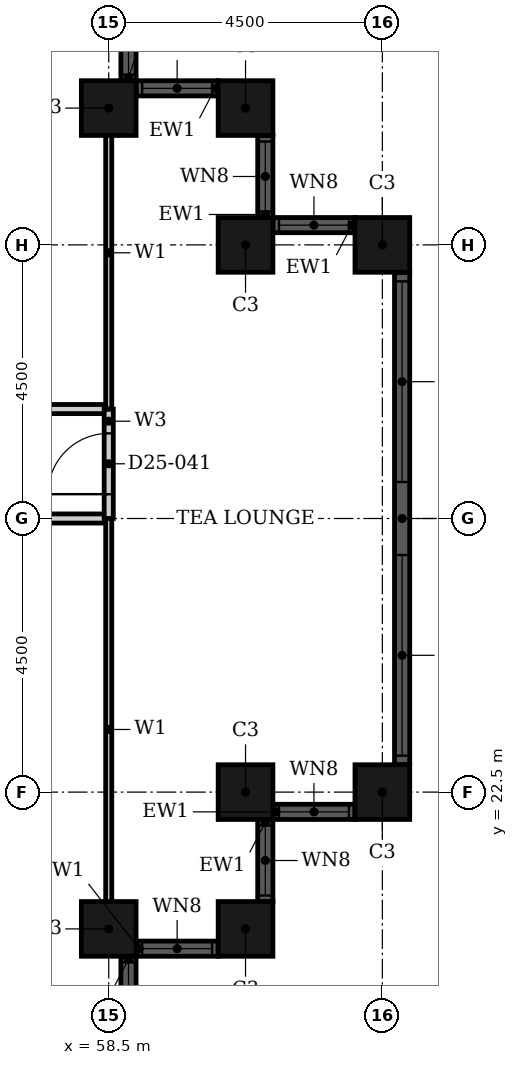
"""IFC4 building model, lengths in metres.
Left out: names, types, materials, properties, quantities, classifications, styles, units other than length and angle.
Written with IfcOpenShell. Run it as: python <this file> out.ifc"""

import sys

from ifc_helpers import new_model, si_unit, direction, frame, frame_2d, origin, origin_2d, place, context, subcontext, project, spatial, rectangle, hollow_rectangle, extrude, element, fill, save


model = new_model("IFC4")
c1 = context("Model", 3, precision=1e-05, world=origin(), true_north=direction((0.0, 1.0)))
c2 = subcontext(c1, "Body", "Model", "MODEL_VIEW")
j1 = project(units=[si_unit("LENGTHUNIT", "METRE"), si_unit("PLANEANGLEUNIT", "RADIAN")], contexts=[c1])
p1 = place(None, origin())
s1 = spatial("IfcSite", under=j1, at=p1, CompositionType="ELEMENT")
p2 = place(p1, origin())
s2 = spatial("IfcBuilding", under=s1, at=p2, CompositionType="ELEMENT")
p3 = place(p2, frame((0.0, 0.0, 104.4)))
s3 = spatial("IfcBuildingStorey", under=s2, at=p3, CompositionType="ELEMENT", Elevation=104.4)
for number, where, z_axis, x_axis in (
    (1, (58.5, 20.25, 0.0), (0.0, 0.0, 1.0), (1.0, 0.0, 0.0)),
    (2, (60.75, 20.25, 0.0), (0.0, 0.0, 1.0), (1.0, 0.0, 0.0)),
    (3, (60.75, 22.5, 0.0), (0.0, 0.0, 1.0), (1.0, 0.0, 0.0)),
    (4, (63.0, 22.5, 0.0), (0.0, 0.0, 1.0), (1.0, 0.0, 0.0)),
    (5, (63.0, 31.5, 0.0), (0.0, 0.0, 1.0), (1.0, 0.0, 0.0)),
    (6, (60.75, 31.5, 0.0), (0.0, 0.0, 1.0), (1.0, 0.0, 0.0)),
    (7, (60.75, 33.75, 0.0), (0.0, 0.0, 1.0), (1.0, 0.0, 0.0)),
    (8, (58.5, 33.75, 0.0), (0.0, 0.0, 1.0), (1.0, 0.0, 0.0)),
):
    element("IfcColumn", number, at=place(p3, frame(where, z_axis=z_axis, x_axis=x_axis)), inside=s3, PredefinedType="COLUMN", context=c2, shape_type="SweptSolid", body=[
        extrude(hollow_rectangle(XDim=0.9, YDim=0.9, WallThickness=0.028, at=origin_2d()), origin(), (0.0, 0.0, 1.0), 3.6),
    ])
p4 = place(p3, frame((58.825, 18.45, 0.0), z_axis=(0.0, 0.0, 1.0), x_axis=(0.0, 1.0, 0.0)))
e9 = element("IfcWall", 9, at=p4, inside=s3, PredefinedType="SOLIDWALL", context=c2, shape_type="SweptSolid", body=[
    extrude(rectangle(XDim=1.35, YDim=0.25, at=frame_2d((0.675, 0.0))), origin(), (0.0, 0.0, 1.0), 3.6),
])
p5 = place(p4, frame((0.1, 0.0, 0.9)))
e10 = element("IfcOpeningElement", 10, at=p5, cuts=e9, PredefinedType="OPENING", context=c2, shape_type="SweptSolid", body=[
    extrude(rectangle(XDim=1.15, YDim=2.08, at=frame_2d((0.575, 1.04))), frame((0.0, 0.135, 0.0), z_axis=(0.0, -1.0, 0.0), x_axis=(1.0, 0.0, 0.0)), (0.0, 0.0, 1.0), 0.27),
])
p6 = place(p3, frame((58.95, 19.925, 0.0), z_axis=(0.0, 0.0, 1.0), x_axis=(1.0, 0.0, 0.0)))
e11 = element("IfcWall", 11, at=p6, inside=s3, PredefinedType="SOLIDWALL", context=c2, shape_type="SweptSolid", body=[
    extrude(rectangle(XDim=1.35, YDim=0.25, at=frame_2d((0.675, 0.0))), origin(), (0.0, 0.0, 1.0), 3.6),
])
p7 = place(p6, frame((0.1, 0.0, 0.9)))
e12 = element("IfcOpeningElement", 12, at=p7, cuts=e11, PredefinedType="OPENING", context=c2, shape_type="SweptSolid", body=[
    extrude(rectangle(XDim=1.15, YDim=2.08, at=frame_2d((0.575, 1.04))), frame((0.0, 0.135, 0.0), z_axis=(0.0, -1.0, 0.0), x_axis=(1.0, 0.0, 0.0)), (0.0, 0.0, 1.0), 0.27),
])
p8 = place(p3, frame((61.075, 20.7, 0.0), z_axis=(0.0, 0.0, 1.0), x_axis=(0.0, 1.0, 0.0)))
e13 = element("IfcWall", 13, at=p8, inside=s3, PredefinedType="SOLIDWALL", context=c2, shape_type="SweptSolid", body=[
    extrude(rectangle(XDim=1.35, YDim=0.25, at=frame_2d((0.675, 0.0))), origin(), (0.0, 0.0, 1.0), 3.6),
])
p9 = place(p8, frame((0.1, 0.0, 0.9)))
e14 = element("IfcOpeningElement", 14, at=p9, cuts=e13, PredefinedType="OPENING", context=c2, shape_type="SweptSolid", body=[
    extrude(rectangle(XDim=1.15, YDim=2.08, at=frame_2d((0.575, 1.04))), frame((0.0, 0.135, 0.0), z_axis=(0.0, -1.0, 0.0), x_axis=(1.0, 0.0, 0.0)), (0.0, 0.0, 1.0), 0.27),
])
p10 = place(p3, frame((61.2, 22.175, 0.0), z_axis=(0.0, 0.0, 1.0), x_axis=(1.0, 0.0, 0.0)))
e15 = element("IfcWall", 15, at=p10, inside=s3, PredefinedType="SOLIDWALL", context=c2, shape_type="SweptSolid", body=[
    extrude(rectangle(XDim=1.35, YDim=0.25, at=frame_2d((0.675, 0.0))), origin(), (0.0, 0.0, 1.0), 3.6),
])
p11 = place(p10, frame((0.1, 0.0, 0.9)))
e16 = element("IfcOpeningElement", 16, at=p11, cuts=e15, PredefinedType="OPENING", context=c2, shape_type="SweptSolid", body=[
    extrude(rectangle(XDim=1.15, YDim=2.08, at=frame_2d((0.575, 1.04))), frame((0.0, 0.135, 0.0), z_axis=(0.0, -1.0, 0.0), x_axis=(1.0, 0.0, 0.0)), (0.0, 0.0, 1.0), 0.27),
])
p12 = place(p3, frame((63.325, 22.95, 0.0), z_axis=(0.0, 0.0, 1.0), x_axis=(0.0, 1.0, 0.0)))
e17 = element("IfcWall", 17, at=p12, inside=s3, PredefinedType="SOLIDWALL", context=c2, shape_type="SweptSolid", body=[
    extrude(rectangle(XDim=8.1, YDim=0.25, at=frame_2d((4.05, 0.0))), origin(), (0.0, 0.0, 1.0), 3.6),
])
p13 = place(p12, frame((0.15, 0.0, 0.9)))
e18 = element("IfcOpeningElement", 18, at=p13, cuts=e17, PredefinedType="OPENING", context=c2, shape_type="SweptSolid", body=[
    extrude(rectangle(XDim=3.3, YDim=2.08, at=frame_2d((1.65, 1.04))), frame((0.0, 0.135, 0.0), z_axis=(0.0, -1.0, 0.0), x_axis=(1.0, 0.0, 0.0)), (0.0, 0.0, 1.0), 0.27),
])
p14 = place(p12, frame((4.65, 0.0, 0.9)))
e19 = element("IfcOpeningElement", 19, at=p14, cuts=e17, PredefinedType="OPENING", context=c2, shape_type="SweptSolid", body=[
    extrude(rectangle(XDim=3.3, YDim=2.08, at=frame_2d((1.65, 1.04))), frame((0.0, 0.135, 0.0), z_axis=(0.0, -1.0, 0.0), x_axis=(1.0, 0.0, 0.0)), (0.0, 0.0, 1.0), 0.27),
])
p15 = place(p3, frame((62.55, 31.825, 0.0), z_axis=(0.0, 0.0, 1.0), x_axis=(-1.0, 0.0, 0.0)))
e20 = element("IfcWall", 20, at=p15, inside=s3, PredefinedType="SOLIDWALL", context=c2, shape_type="SweptSolid", body=[
    extrude(rectangle(XDim=1.35, YDim=0.25, at=frame_2d((0.675, 0.0))), origin(), (0.0, 0.0, 1.0), 3.6),
])
p16 = place(p15, frame((0.1, 0.0, 0.9)))
e21 = element("IfcOpeningElement", 21, at=p16, cuts=e20, PredefinedType="OPENING", context=c2, shape_type="SweptSolid", body=[
    extrude(rectangle(XDim=1.15, YDim=2.08, at=frame_2d((0.575, 1.04))), frame((0.0, 0.135, 0.0), z_axis=(0.0, -1.0, 0.0), x_axis=(1.0, 0.0, 0.0)), (0.0, 0.0, 1.0), 0.27),
])
p17 = place(p3, frame((61.075, 31.95, 0.0), z_axis=(0.0, 0.0, 1.0), x_axis=(0.0, 1.0, 0.0)))
e22 = element("IfcWall", 22, at=p17, inside=s3, PredefinedType="SOLIDWALL", context=c2, shape_type="SweptSolid", body=[
    extrude(rectangle(XDim=1.35, YDim=0.25, at=frame_2d((0.675, 0.0))), origin(), (0.0, 0.0, 1.0), 3.6),
])
p18 = place(p17, frame((0.1, 0.0, 0.9)))
e23 = element("IfcOpeningElement", 23, at=p18, cuts=e22, PredefinedType="OPENING", context=c2, shape_type="SweptSolid", body=[
    extrude(rectangle(XDim=1.15, YDim=2.08, at=frame_2d((0.575, 1.04))), frame((0.0, 0.135, 0.0), z_axis=(0.0, -1.0, 0.0), x_axis=(1.0, 0.0, 0.0)), (0.0, 0.0, 1.0), 0.27),
])
p19 = place(p3, frame((60.3, 34.075, 0.0), z_axis=(0.0, 0.0, 1.0), x_axis=(-1.0, 0.0, 0.0)))
e24 = element("IfcWall", 24, at=p19, inside=s3, PredefinedType="SOLIDWALL", context=c2, shape_type="SweptSolid", body=[
    extrude(rectangle(XDim=1.35, YDim=0.25, at=frame_2d((0.675, 0.0))), origin(), (0.0, 0.0, 1.0), 3.6),
])
p20 = place(p19, frame((0.1, 0.0, 0.9)))
e25 = element("IfcOpeningElement", 25, at=p20, cuts=e24, PredefinedType="OPENING", context=c2, shape_type="SweptSolid", body=[
    extrude(rectangle(XDim=1.15, YDim=2.08, at=frame_2d((0.575, 1.04))), frame((0.0, 0.135, 0.0), z_axis=(0.0, -1.0, 0.0), x_axis=(1.0, 0.0, 0.0)), (0.0, 0.0, 1.0), 0.27),
])
p21 = place(p3, frame((58.825, 34.2, 0.0), z_axis=(0.0, 0.0, 1.0), x_axis=(0.0, 1.0, 0.0)))
e26 = element("IfcWall", 26, at=p21, inside=s3, PredefinedType="SOLIDWALL", context=c2, shape_type="SweptSolid", body=[
    extrude(rectangle(XDim=1.35, YDim=0.25, at=frame_2d((0.675, 0.0))), origin(), (0.0, 0.0, 1.0), 3.6),
])
p22 = place(p21, frame((0.1, 0.0, 0.9)))
e27 = element("IfcOpeningElement", 27, at=p22, cuts=e26, PredefinedType="OPENING", context=c2, shape_type="SweptSolid", body=[
    extrude(rectangle(XDim=1.15, YDim=2.08, at=frame_2d((0.575, 1.04))), frame((0.0, 0.135, 0.0), z_axis=(0.0, -1.0, 0.0), x_axis=(1.0, 0.0, 0.0)), (0.0, 0.0, 1.0), 0.27),
])
p23 = place(p3, frame((46.8, 27.0, 0.0), z_axis=(0.0, 0.0, 1.0), x_axis=(1.0, 0.0, 0.0)))
e28 = element("IfcWall", 28, at=p23, inside=s3, PredefinedType="PARTITIONING", context=c2, shape_type="SweptSolid", body=[
    extrude(rectangle(XDim=11.7, YDim=0.15, at=frame_2d((5.85, 0.0))), origin(), (0.0, 0.0, 1.0), 2.58),
])
p24 = place(p23, frame((4.45, 0.0, 0.0)))
e29 = element("IfcOpeningElement", 29, at=p24, cuts=e28, PredefinedType="OPENING", context=c2, shape_type="SweptSolid", body=[
    extrude(rectangle(XDim=1.0, YDim=2.1, at=frame_2d((0.5, 1.05))), frame((0.0, 0.085, 0.0), z_axis=(0.0, -1.0, 0.0), x_axis=(1.0, 0.0, 0.0)), (0.0, 0.0, 1.0), 0.17),
])
p25 = place(p3, frame((46.8, 28.8, 0.0), z_axis=(0.0, 0.0, 1.0), x_axis=(1.0, 0.0, 0.0)))
e30 = element("IfcWall", 30, at=p25, inside=s3, PredefinedType="PARTITIONING", context=c2, shape_type="SweptSolid", body=[
    extrude(rectangle(XDim=11.7, YDim=0.15, at=frame_2d((5.85, 0.0))), origin(), (0.0, 0.0, 1.0), 3.3),
])
p26 = place(p25, frame((4.45, 0.0, 0.0)))
e31 = element("IfcOpeningElement", 31, at=p26, cuts=e30, PredefinedType="OPENING", context=c2, shape_type="SweptSolid", body=[
    extrude(rectangle(XDim=1.0, YDim=2.1, at=frame_2d((0.5, 1.05))), frame((0.0, 0.085, 0.0), z_axis=(0.0, -1.0, 0.0), x_axis=(1.0, 0.0, 0.0)), (0.0, 0.0, 1.0), 0.17),
])
p27 = place(p3, frame((58.5, 27.0, 0.0), z_axis=(0.0, 0.0, 1.0), x_axis=(0.0, 1.0, 0.0)))
e32 = element("IfcWall", 32, at=p27, inside=s3, PredefinedType="PARTITIONING", context=c2, shape_type="SweptSolid", body=[
    extrude(rectangle(XDim=1.8, YDim=0.15, at=frame_2d((0.9, 0.0))), origin(), (0.0, 0.0, 1.0), 3.3),
])
p28 = place(p27, frame((0.4, 0.0, 0.0)))
e33 = element("IfcOpeningElement", 33, at=p28, cuts=e32, PredefinedType="OPENING", context=c2, shape_type="SweptSolid", body=[
    extrude(rectangle(XDim=1.0, YDim=2.1, at=frame_2d((0.5, 1.05))), frame((0.0, 0.085, 0.0), z_axis=(0.0, -1.0, 0.0), x_axis=(1.0, 0.0, 0.0)), (0.0, 0.0, 1.0), 0.17),
])
p29 = place(p3, frame((58.5, 28.8, 0.0), z_axis=(0.0, 0.0, 1.0), x_axis=(0.0, 1.0, 0.0)))
e34 = element("IfcWall", 34, at=p29, inside=s3, PredefinedType="PARTITIONING", context=c2, shape_type="SweptSolid", body=[
    extrude(rectangle(XDim=5.14, YDim=0.1, at=frame_2d((2.57, 0.0))), origin(), (0.0, 0.0, 1.0), 3.3),
])
p30 = place(p3, frame((58.5, 20.06, 0.0), z_axis=(0.0, 0.0, 1.0), x_axis=(0.0, 1.0, 0.0)))
e35 = element("IfcWall", 35, at=p30, inside=s3, PredefinedType="PARTITIONING", context=c2, shape_type="SweptSolid", body=[
    extrude(rectangle(XDim=6.94, YDim=0.1, at=frame_2d((3.47, 0.0))), origin(), (0.0, 0.0, 1.0), 3.3),
])
p31 = place(p5, origin())
e36 = element("IfcWindow", 36, at=p31, inside=s3, PartitioningType="SINGLE_PANEL", PredefinedType="WINDOW", context=c2, shape_type="SweptSolid", body=[
    extrude(rectangle(XDim=1.15, YDim=2.08, at=frame_2d((0.575, 1.04))), frame((0.0, 0.03, 0.0), z_axis=(0.0, -1.0, 0.0), x_axis=(1.0, 0.0, 0.0)), (0.0, 0.0, 1.0), 0.06),
])
fill(e10, e36)
p32 = place(p7, origin())
e37 = element("IfcWindow", 37, at=p32, inside=s3, PartitioningType="SINGLE_PANEL", PredefinedType="WINDOW", context=c2, shape_type="SweptSolid", body=[
    extrude(rectangle(XDim=1.15, YDim=2.08, at=frame_2d((0.575, 1.04))), frame((0.0, 0.03, 0.0), z_axis=(0.0, -1.0, 0.0), x_axis=(1.0, 0.0, 0.0)), (0.0, 0.0, 1.0), 0.06),
])
fill(e12, e37)
p33 = place(p9, origin())
e38 = element("IfcWindow", 38, at=p33, inside=s3, PartitioningType="SINGLE_PANEL", PredefinedType="WINDOW", context=c2, shape_type="SweptSolid", body=[
    extrude(rectangle(XDim=1.15, YDim=2.08, at=frame_2d((0.575, 1.04))), frame((0.0, 0.03, 0.0), z_axis=(0.0, -1.0, 0.0), x_axis=(1.0, 0.0, 0.0)), (0.0, 0.0, 1.0), 0.06),
])
fill(e14, e38)
p34 = place(p11, origin())
e39 = element("IfcWindow", 39, at=p34, inside=s3, PartitioningType="SINGLE_PANEL", PredefinedType="WINDOW", context=c2, shape_type="SweptSolid", body=[
    extrude(rectangle(XDim=1.15, YDim=2.08, at=frame_2d((0.575, 1.04))), frame((0.0, 0.03, 0.0), z_axis=(0.0, -1.0, 0.0), x_axis=(1.0, 0.0, 0.0)), (0.0, 0.0, 1.0), 0.06),
])
fill(e16, e39)
p35 = place(p13, origin())
e40 = element("IfcWindow", 40, at=p35, inside=s3, PartitioningType="SINGLE_PANEL", PredefinedType="WINDOW", context=c2, shape_type="SweptSolid", body=[
    extrude(rectangle(XDim=3.3, YDim=2.08, at=frame_2d((1.65, 1.04))), frame((0.0, 0.03, 0.0), z_axis=(0.0, -1.0, 0.0), x_axis=(1.0, 0.0, 0.0)), (0.0, 0.0, 1.0), 0.06),
])
fill(e18, e40)
p36 = place(p14, origin())
e41 = element("IfcWindow", 41, at=p36, inside=s3, PartitioningType="SINGLE_PANEL", PredefinedType="WINDOW", context=c2, shape_type="SweptSolid", body=[
    extrude(rectangle(XDim=3.3, YDim=2.08, at=frame_2d((1.65, 1.04))), frame((0.0, 0.03, 0.0), z_axis=(0.0, -1.0, 0.0), x_axis=(1.0, 0.0, 0.0)), (0.0, 0.0, 1.0), 0.06),
])
fill(e19, e41)
p37 = place(p16, origin())
e42 = element("IfcWindow", 42, at=p37, inside=s3, PartitioningType="SINGLE_PANEL", PredefinedType="WINDOW", context=c2, shape_type="SweptSolid", body=[
    extrude(rectangle(XDim=1.15, YDim=2.08, at=frame_2d((0.575, 1.04))), frame((0.0, 0.03, 0.0), z_axis=(0.0, -1.0, 0.0), x_axis=(1.0, 0.0, 0.0)), (0.0, 0.0, 1.0), 0.06),
])
fill(e21, e42)
p38 = place(p18, origin())
e43 = element("IfcWindow", 43, at=p38, inside=s3, PartitioningType="SINGLE_PANEL", PredefinedType="WINDOW", context=c2, shape_type="SweptSolid", body=[
    extrude(rectangle(XDim=1.15, YDim=2.08, at=frame_2d((0.575, 1.04))), frame((0.0, 0.03, 0.0), z_axis=(0.0, -1.0, 0.0), x_axis=(1.0, 0.0, 0.0)), (0.0, 0.0, 1.0), 0.06),
])
fill(e23, e43)
p39 = place(p20, origin())
e44 = element("IfcWindow", 44, at=p39, inside=s3, PartitioningType="SINGLE_PANEL", PredefinedType="WINDOW", context=c2, shape_type="SweptSolid", body=[
    extrude(rectangle(XDim=1.15, YDim=2.08, at=frame_2d((0.575, 1.04))), frame((0.0, 0.03, 0.0), z_axis=(0.0, -1.0, 0.0), x_axis=(1.0, 0.0, 0.0)), (0.0, 0.0, 1.0), 0.06),
])
fill(e25, e44)
p40 = place(p22, origin())
e45 = element("IfcWindow", 45, at=p40, inside=s3, PartitioningType="SINGLE_PANEL", PredefinedType="WINDOW", context=c2, shape_type="SweptSolid", body=[
    extrude(rectangle(XDim=1.15, YDim=2.08, at=frame_2d((0.575, 1.04))), frame((0.0, 0.03, 0.0), z_axis=(0.0, -1.0, 0.0), x_axis=(1.0, 0.0, 0.0)), (0.0, 0.0, 1.0), 0.06),
])
fill(e27, e45)
p41 = place(p28, origin())
e46 = element("IfcDoor", 46, at=p41, inside=s3, OperationType="SINGLE_SWING_RIGHT", PredefinedType="DOOR", context=c2, shape_type="SweptSolid", body=[
    extrude(rectangle(XDim=1.0, YDim=2.1, at=frame_2d((0.5, 1.05))), frame((0.0, 0.025, 0.0), z_axis=(0.0, -1.0, 0.0), x_axis=(1.0, 0.0, 0.0)), (0.0, 0.0, 1.0), 0.05),
])
fill(e33, e46)
save(model, sys.argv[1])
